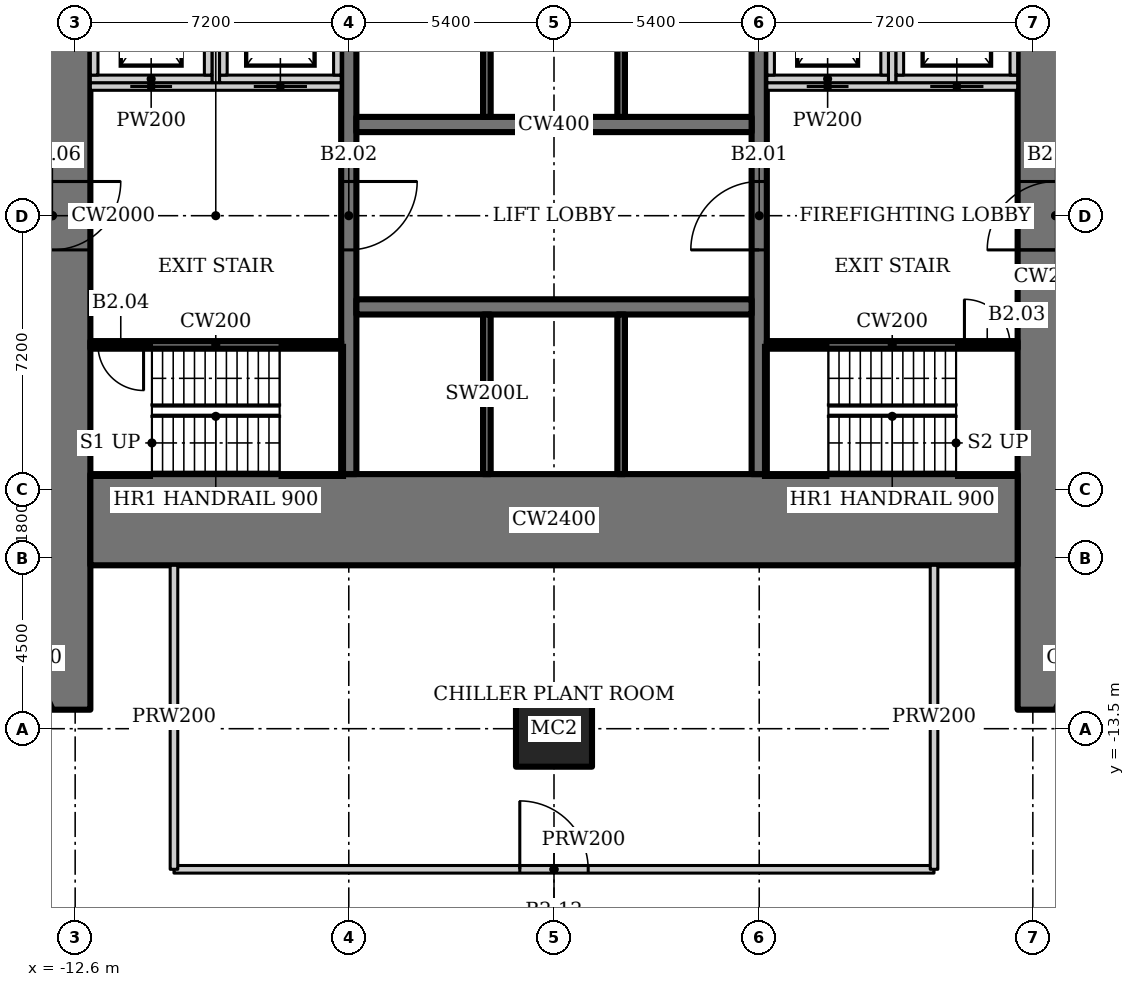
"""IFC4 building model, lengths in metres.
Left out: names, types, materials, properties, quantities, classifications, styles, units other than length and angle.
Written with IfcOpenShell. Run it as: python <this file> out.ifc"""

import sys

from ifc_helpers import new_model, si_unit, direction, frame, frame_2d, origin, origin_2d, place, context, subcontext, project, spatial, rectangle, hollow_rectangle, extrude, element, fill, save


model = new_model("IFC4")
c1 = context("Model", 3, precision=1e-05, world=origin(), true_north=direction((0.0, 1.0)))
c2 = subcontext(c1, "Body", "Model", "MODEL_VIEW")
j1 = project(units=[si_unit("LENGTHUNIT", "METRE"), si_unit("PLANEANGLEUNIT", "RADIAN")], contexts=[c1])
p1 = place(None, origin())
s1 = spatial("IfcSite", under=j1, at=p1, CompositionType="ELEMENT")
p2 = place(p1, origin())
s2 = spatial("IfcBuilding", under=s1, at=p2, CompositionType="ELEMENT")
p3 = place(p2, frame((0.0, 0.0, -10.0)))
s3 = spatial("IfcBuildingStorey", under=s2, at=p3, CompositionType="ELEMENT", Elevation=-10.0)
p4 = place(p3, frame((0.0, -13.5, 0.0), z_axis=(0.0, 0.0, 1.0), x_axis=(1.0, 0.0, 0.0)))
e1 = element("IfcColumn", 1, at=p4, inside=s3, PredefinedType="COLUMN", context=c2, shape_type="SweptSolid", body=[
    extrude(hollow_rectangle(XDim=2.0, YDim=2.0, WallThickness=0.17, at=origin_2d()), origin(), (0.0, 0.0, 1.0), 4.5),
])
p5 = place(p3, frame((13.2, -13.0, 0.0), z_axis=(0.0, 0.0, 1.0), x_axis=(0.0, 1.0, 0.0)))
e2 = element("IfcWall", 2, at=p5, inside=s3, PredefinedType="SHEAR", context=c2, shape_type="SweptSolid", body=[
    extrude(rectangle(XDim=26.0, YDim=2.0, at=frame_2d((13.0, 0.0))), origin(), (0.0, 0.0, 1.0), 4.5),
])
p6 = place(p5, frame((12.1, 0.0, 0.0)))
e3 = element("IfcOpeningElement", 3, at=p6, cuts=e2, PredefinedType="OPENING", context=c2, shape_type="SweptSolid", body=[
    extrude(rectangle(XDim=1.8, YDim=2.1, at=frame_2d((0.9, 1.05))), frame((0.0, 1.01, 0.0), z_axis=(0.0, -1.0, 0.0), x_axis=(1.0, 0.0, 0.0)), (0.0, 0.0, 1.0), 2.02),
])
p7 = place(p3, frame((-13.2, 13.0, 0.0), z_axis=(0.0, 0.0, 1.0), x_axis=(0.0, -1.0, 0.0)))
e4 = element("IfcWall", 4, at=p7, inside=s3, PredefinedType="SHEAR", context=c2, shape_type="SweptSolid", body=[
    extrude(rectangle(XDim=26.0, YDim=2.0, at=frame_2d((13.0, 0.0))), origin(), (0.0, 0.0, 1.0), 4.5),
])
p8 = place(p7, frame((12.1, 0.0, 0.0)))
e5 = element("IfcOpeningElement", 5, at=p8, cuts=e4, PredefinedType="OPENING", context=c2, shape_type="SweptSolid", body=[
    extrude(rectangle(XDim=1.8, YDim=2.1, at=frame_2d((0.9, 1.05))), frame((0.0, 1.01, 0.0), z_axis=(0.0, -1.0, 0.0), x_axis=(1.0, 0.0, 0.0)), (0.0, 0.0, 1.0), 2.02),
])
p9 = place(p3, frame((-12.2, -8.0, 0.0), z_axis=(0.0, 0.0, 1.0), x_axis=(1.0, 0.0, 0.0)))
e6 = element("IfcWall", 6, at=p9, inside=s3, PredefinedType="SHEAR", context=c2, shape_type="SweptSolid", body=[
    extrude(rectangle(XDim=24.4, YDim=2.4, at=frame_2d((12.2, 0.0))), origin(), (0.0, 0.0, 1.0), 4.5),
])
p10 = place(p3, frame((5.4, -6.8, 0.0), z_axis=(0.0, 0.0, 1.0), x_axis=(0.0, 1.0, 0.0)))
e7 = element("IfcWall", 7, at=p10, inside=s3, PredefinedType="SHEAR", context=c2, shape_type="SweptSolid", body=[
    extrude(rectangle(XDim=13.6, YDim=0.4, at=frame_2d((6.8, 0.0))), origin(), (0.0, 0.0, 1.0), 4.5),
])
p11 = place(p10, frame((5.9, 0.0, 0.0)))
e8 = element("IfcOpeningElement", 8, at=p11, cuts=e7, PredefinedType="OPENING", context=c2, shape_type="SweptSolid", body=[
    extrude(rectangle(XDim=1.8, YDim=2.1, at=frame_2d((0.9, 1.05))), frame((0.0, 0.21, 0.0), z_axis=(0.0, -1.0, 0.0), x_axis=(1.0, 0.0, 0.0)), (0.0, 0.0, 1.0), 0.42),
])
p12 = place(p3, frame((-5.4, 6.8, 0.0), z_axis=(0.0, 0.0, 1.0), x_axis=(0.0, -1.0, 0.0)))
e9 = element("IfcWall", 9, at=p12, inside=s3, PredefinedType="SHEAR", context=c2, shape_type="SweptSolid", body=[
    extrude(rectangle(XDim=13.6, YDim=0.4, at=frame_2d((6.8, 0.0))), origin(), (0.0, 0.0, 1.0), 4.5),
])
p13 = place(p12, frame((5.9, 0.0, 0.0)))
e10 = element("IfcOpeningElement", 10, at=p13, cuts=e9, PredefinedType="OPENING", context=c2, shape_type="SweptSolid", body=[
    extrude(rectangle(XDim=1.8, YDim=2.1, at=frame_2d((0.9, 1.05))), frame((0.0, 0.21, 0.0), z_axis=(0.0, -1.0, 0.0), x_axis=(1.0, 0.0, 0.0)), (0.0, 0.0, 1.0), 0.42),
])
p14 = place(p3, frame((-5.2, -2.4, 0.0), z_axis=(0.0, 0.0, 1.0), x_axis=(1.0, 0.0, 0.0)))
e11 = element("IfcWall", 11, at=p14, inside=s3, PredefinedType="SHEAR", context=c2, shape_type="SweptSolid", body=[
    extrude(rectangle(XDim=10.4, YDim=0.4, at=frame_2d((5.2, 0.0))), origin(), (0.0, 0.0, 1.0), 4.5),
])
for number, where, z_axis, x_axis in (
    (12, (-1.767, -2.6, 0.0), (0.0, 0.0, 1.0), (0.0, -1.0, 0.0)),
    (13, (1.767, -2.6, 0.0), (0.0, 0.0, 1.0), (0.0, -1.0, 0.0)),
):
    element("IfcWall", number, at=place(p3, frame(where, z_axis=z_axis, x_axis=x_axis)), inside=s3, PredefinedType="SOLIDWALL", context=c2, shape_type="SweptSolid", body=[
        extrude(rectangle(XDim=4.2, YDim=0.2, at=frame_2d((2.1, 0.0))), origin(), (0.0, 0.0, 1.0), 4.5),
    ])
p15 = place(p3, frame((5.2, 2.4, 0.0), z_axis=(0.0, 0.0, 1.0), x_axis=(-1.0, 0.0, 0.0)))
e14 = element("IfcWall", 14, at=p15, inside=s3, PredefinedType="SHEAR", context=c2, shape_type="SweptSolid", body=[
    extrude(rectangle(XDim=10.4, YDim=0.4, at=frame_2d((5.2, 0.0))), origin(), (0.0, 0.0, 1.0), 4.5),
])
for number, where, z_axis, x_axis in (
    (15, (-1.767, 2.6, 0.0), (0.0, 0.0, 1.0), (0.0, 1.0, 0.0)),
    (16, (1.767, 2.6, 0.0), (0.0, 0.0, 1.0), (0.0, 1.0, 0.0)),
):
    element("IfcWall", number, at=place(p3, frame(where, z_axis=z_axis, x_axis=x_axis)), inside=s3, PredefinedType="SOLIDWALL", context=c2, shape_type="SweptSolid", body=[
        extrude(rectangle(XDim=4.2, YDim=0.2, at=frame_2d((2.1, 0.0))), origin(), (0.0, 0.0, 1.0), 4.5),
    ])
p16 = place(p3, frame((5.6, -3.4, 0.0), z_axis=(0.0, 0.0, 1.0), x_axis=(1.0, 0.0, 0.0)))
e17 = element("IfcWall", 17, at=p16, inside=s3, PredefinedType="SHEAR", context=c2, shape_type="SweptSolid", body=[
    extrude(rectangle(XDim=6.6, YDim=0.2, at=frame_2d((3.3, 0.0))), origin(), (0.0, 0.0, 1.0), 4.5),
])
p17 = place(p16, frame((5.2, 0.0, 0.0)))
e18 = element("IfcOpeningElement", 18, at=p17, cuts=e17, PredefinedType="OPENING", context=c2, shape_type="SweptSolid", body=[
    extrude(rectangle(XDim=1.2, YDim=2.1, at=frame_2d((0.6, 1.05))), frame((0.0, 0.11, 0.0), z_axis=(0.0, -1.0, 0.0), x_axis=(1.0, 0.0, 0.0)), (0.0, 0.0, 1.0), 0.22),
])
p18 = place(p3, frame((12.2, 3.4, 0.0), z_axis=(0.0, 0.0, 1.0), x_axis=(-1.0, 0.0, 0.0)))
e19 = element("IfcWall", 19, at=p18, inside=s3, PredefinedType="SOLIDWALL", context=c2, shape_type="SweptSolid", body=[
    extrude(rectangle(XDim=6.6, YDim=0.2, at=frame_2d((3.3, 0.0))), origin(), (0.0, 0.0, 1.0), 4.5),
])
p19 = place(p18, frame((4.45, 0.0, 0.0)))
e20 = element("IfcOpeningElement", 20, at=p19, cuts=e19, PredefinedType="OPENING", context=c2, shape_type="SweptSolid", body=[
    extrude(rectangle(XDim=1.1, YDim=2.2, at=frame_2d((0.55, 1.1))), frame((0.0, 0.11, 0.0), z_axis=(0.0, -1.0, 0.0), x_axis=(1.0, 0.0, 0.0)), (0.0, 0.0, 1.0), 0.22),
])
p20 = place(p18, frame((0.9, 0.0, 0.0)))
e21 = element("IfcOpeningElement", 21, at=p20, cuts=e19, PredefinedType="OPENING", context=c2, shape_type="SweptSolid", body=[
    extrude(rectangle(XDim=1.4, YDim=2.2, at=frame_2d((0.7, 1.1))), frame((0.0, 0.11, 0.0), z_axis=(0.0, -1.0, 0.0), x_axis=(1.0, 0.0, 0.0)), (0.0, 0.0, 1.0), 0.22),
])
p21 = place(p3, frame((8.9, 3.5, 0.0), z_axis=(0.0, 0.0, 1.0), x_axis=(0.0, 1.0, 0.0)))
e22 = element("IfcWall", 22, at=p21, inside=s3, PredefinedType="SOLIDWALL", context=c2, shape_type="SweptSolid", body=[
    extrude(rectangle(XDim=3.3, YDim=0.2, at=frame_2d((1.65, 0.0))), origin(), (0.0, 0.0, 1.0), 4.5),
])
p22 = place(p3, frame((-5.6, -3.4, 0.0), z_axis=(0.0, 0.0, 1.0), x_axis=(-1.0, 0.0, 0.0)))
e23 = element("IfcWall", 23, at=p22, inside=s3, PredefinedType="SHEAR", context=c2, shape_type="SweptSolid", body=[
    extrude(rectangle(XDim=6.6, YDim=0.2, at=frame_2d((3.3, 0.0))), origin(), (0.0, 0.0, 1.0), 4.5),
])
p23 = place(p22, frame((5.2, 0.0, 0.0)))
e24 = element("IfcOpeningElement", 24, at=p23, cuts=e23, PredefinedType="OPENING", context=c2, shape_type="SweptSolid", body=[
    extrude(rectangle(XDim=1.2, YDim=2.1, at=frame_2d((0.6, 1.05))), frame((0.0, 0.11, 0.0), z_axis=(0.0, -1.0, 0.0), x_axis=(1.0, 0.0, 0.0)), (0.0, 0.0, 1.0), 0.22),
])
p24 = place(p3, frame((-12.2, 3.4, 0.0), z_axis=(0.0, 0.0, 1.0), x_axis=(1.0, 0.0, 0.0)))
e25 = element("IfcWall", 25, at=p24, inside=s3, PredefinedType="SOLIDWALL", context=c2, shape_type="SweptSolid", body=[
    extrude(rectangle(XDim=6.6, YDim=0.2, at=frame_2d((3.3, 0.0))), origin(), (0.0, 0.0, 1.0), 4.5),
])
p25 = place(p24, frame((1.05, 0.0, 0.0)))
e26 = element("IfcOpeningElement", 26, at=p25, cuts=e25, PredefinedType="OPENING", context=c2, shape_type="SweptSolid", body=[
    extrude(rectangle(XDim=1.1, YDim=2.2, at=frame_2d((0.55, 1.1))), frame((0.0, 0.11, 0.0), z_axis=(0.0, -1.0, 0.0), x_axis=(1.0, 0.0, 0.0)), (0.0, 0.0, 1.0), 0.22),
])
p26 = place(p24, frame((4.3, 0.0, 0.0)))
e27 = element("IfcOpeningElement", 27, at=p26, cuts=e25, PredefinedType="OPENING", context=c2, shape_type="SweptSolid", body=[
    extrude(rectangle(XDim=1.4, YDim=2.2, at=frame_2d((0.7, 1.1))), frame((0.0, 0.11, 0.0), z_axis=(0.0, -1.0, 0.0), x_axis=(1.0, 0.0, 0.0)), (0.0, 0.0, 1.0), 0.22),
])
p27 = place(p3, frame((-8.9, 3.5, 0.0), z_axis=(0.0, 0.0, 1.0), x_axis=(0.0, 1.0, 0.0)))
e28 = element("IfcWall", 28, at=p27, inside=s3, PredefinedType="SOLIDWALL", context=c2, shape_type="SweptSolid", body=[
    extrude(rectangle(XDim=3.3, YDim=0.2, at=frame_2d((1.65, 0.0))), origin(), (0.0, 0.0, 1.0), 4.5),
])
p28 = place(p3, frame((-10.0, -17.2, 0.0), z_axis=(0.0, 0.0, 1.0), x_axis=(1.0, 0.0, 0.0)))
e29 = element("IfcWall", 29, at=p28, inside=s3, PredefinedType="SOLIDWALL", context=c2, shape_type="SweptSolid", body=[
    extrude(rectangle(XDim=20.0, YDim=0.2, at=frame_2d((10.0, 0.0))), origin(), (0.0, 0.0, 1.0), 4.2),
])
p29 = place(p28, frame((9.1, 0.0, 0.0)))
e30 = element("IfcOpeningElement", 30, at=p29, cuts=e29, PredefinedType="OPENING", context=c2, shape_type="SweptSolid", body=[
    extrude(rectangle(XDim=1.8, YDim=2.1, at=frame_2d((0.9, 1.05))), frame((0.0, 0.11, 0.0), z_axis=(0.0, -1.0, 0.0), x_axis=(1.0, 0.0, 0.0)), (0.0, 0.0, 1.0), 0.22),
])
for number, where, z_axis, x_axis in (
    (31, (-10.0, -9.2, 0.0), (0.0, 0.0, 1.0), (0.0, -1.0, 0.0)),
    (32, (10.0, -9.2, 0.0), (0.0, 0.0, 1.0), (0.0, -1.0, 0.0)),
):
    element("IfcWall", number, at=place(p3, frame(where, z_axis=z_axis, x_axis=x_axis)), inside=s3, PredefinedType="SOLIDWALL", context=c2, shape_type="SweptSolid", body=[
        extrude(rectangle(XDim=8.0, YDim=0.2, at=frame_2d((4.0, 0.0))), origin(), (0.0, 0.0, 1.0), 4.2),
    ])
for number, where, z_axis, x_axis in (
    (33, (13.2, -13.0, 0.0), (0.0, 0.0, 1.0), (0.42, 0.907, 0.0)),
    (34, (-13.2, -13.0, 0.0), (0.0, 0.0, 1.0), (-0.42, 0.907, 0.0)),
):
    element("IfcWall", number, at=place(p3, frame(where, z_axis=z_axis, x_axis=x_axis)), inside=s3, PredefinedType="PARTITIONING", context=c2, shape_type="SweptSolid", body=[
        extrude(rectangle(XDim=2.975, YDim=0.1, at=frame_2d((1.488, 0.0))), origin(), (0.0, 0.0, 1.0), 4.2),
    ])
p30 = place(p3, frame((-12.2, 3.6, -1.8), z_axis=(0.0, 0.0, 1.0), x_axis=(1.0, 0.0, 0.0)))
e35 = element("IfcWall", 35, at=p30, inside=s3, PredefinedType="SOLIDWALL", context=c2, shape_type="SweptSolid", body=[
    extrude(rectangle(XDim=3.2, YDim=0.2, at=frame_2d((1.6, 0.0))), origin(), (0.0, 0.0, 1.0), 1.0),
])
for number, where, z_axis, x_axis in (
    (36, (-9.1, 3.7, -1.8), (0.0, 0.0, 1.0), (0.0, 1.0, 0.0)),
    (37, (-12.1, 6.6, -1.8), (0.0, 0.0, 1.0), (0.0, -1.0, 0.0)),
):
    element("IfcWall", number, at=place(p3, frame(where, z_axis=z_axis, x_axis=x_axis)), inside=s3, PredefinedType="SOLIDWALL", context=c2, shape_type="SweptSolid", body=[
        extrude(rectangle(XDim=2.9, YDim=0.2, at=frame_2d((1.45, 0.0))), origin(), (0.0, 0.0, 1.0), 1.0),
    ])
p31 = place(p3, frame((-8.8, 3.6, -1.8), z_axis=(0.0, 0.0, 1.0), x_axis=(1.0, 0.0, 0.0)))
e38 = element("IfcWall", 38, at=p31, inside=s3, PredefinedType="SOLIDWALL", context=c2, shape_type="SweptSolid", body=[
    extrude(rectangle(XDim=3.2, YDim=0.2, at=frame_2d((1.6, 0.0))), origin(), (0.0, 0.0, 1.0), 1.0),
])
for number, where, z_axis, x_axis in (
    (39, (-5.7, 3.7, -1.8), (0.0, 0.0, 1.0), (0.0, 1.0, 0.0)),
    (40, (-8.7, 6.6, -1.8), (0.0, 0.0, 1.0), (0.0, -1.0, 0.0)),
):
    element("IfcWall", number, at=place(p3, frame(where, z_axis=z_axis, x_axis=x_axis)), inside=s3, PredefinedType="SOLIDWALL", context=c2, shape_type="SweptSolid", body=[
        extrude(rectangle(XDim=2.9, YDim=0.2, at=frame_2d((1.45, 0.0))), origin(), (0.0, 0.0, 1.0), 1.0),
    ])
p32 = place(p3, frame((5.6, 3.6, -1.8), z_axis=(0.0, 0.0, 1.0), x_axis=(1.0, 0.0, 0.0)))
e41 = element("IfcWall", 41, at=p32, inside=s3, PredefinedType="SOLIDWALL", context=c2, shape_type="SweptSolid", body=[
    extrude(rectangle(XDim=3.2, YDim=0.2, at=frame_2d((1.6, 0.0))), origin(), (0.0, 0.0, 1.0), 1.0),
])
for number, where, z_axis, x_axis in (
    (42, (8.7, 3.7, -1.8), (0.0, 0.0, 1.0), (0.0, 1.0, 0.0)),
    (43, (5.7, 6.6, -1.8), (0.0, 0.0, 1.0), (0.0, -1.0, 0.0)),
):
    element("IfcWall", number, at=place(p3, frame(where, z_axis=z_axis, x_axis=x_axis)), inside=s3, PredefinedType="SOLIDWALL", context=c2, shape_type="SweptSolid", body=[
        extrude(rectangle(XDim=2.9, YDim=0.2, at=frame_2d((1.45, 0.0))), origin(), (0.0, 0.0, 1.0), 1.0),
    ])
p33 = place(p3, frame((9.0, 3.6, -1.8), z_axis=(0.0, 0.0, 1.0), x_axis=(1.0, 0.0, 0.0)))
e44 = element("IfcWall", 44, at=p33, inside=s3, PredefinedType="SOLIDWALL", context=c2, shape_type="SweptSolid", body=[
    extrude(rectangle(XDim=3.2, YDim=0.2, at=frame_2d((1.6, 0.0))), origin(), (0.0, 0.0, 1.0), 1.0),
])
for number, where, z_axis, x_axis in (
    (45, (12.1, 3.7, -1.8), (0.0, 0.0, 1.0), (0.0, 1.0, 0.0)),
    (46, (9.1, 6.6, -1.8), (0.0, 0.0, 1.0), (0.0, -1.0, 0.0)),
):
    element("IfcWall", number, at=place(p3, frame(where, z_axis=z_axis, x_axis=x_axis)), inside=s3, PredefinedType="SOLIDWALL", context=c2, shape_type="SweptSolid", body=[
        extrude(rectangle(XDim=2.9, YDim=0.2, at=frame_2d((1.45, 0.0))), origin(), (0.0, 0.0, 1.0), 1.0),
    ])
p34 = place(p11, origin())
e47 = element("IfcDoor", 47, at=p34, inside=s3, OperationType="DOUBLE_DOOR_DOUBLE_SWING", PredefinedType="DOOR", context=c2, shape_type="SweptSolid", body=[
    extrude(rectangle(XDim=1.8, YDim=2.1, at=frame_2d((0.9, 1.05))), frame((0.0, 0.025, 0.0), z_axis=(0.0, -1.0, 0.0), x_axis=(1.0, 0.0, 0.0)), (0.0, 0.0, 1.0), 0.05),
])
fill(e8, e47)
p35 = place(p13, origin())
e48 = element("IfcDoor", 48, at=p35, inside=s3, OperationType="DOUBLE_DOOR_DOUBLE_SWING", PredefinedType="DOOR", context=c2, shape_type="SweptSolid", body=[
    extrude(rectangle(XDim=1.8, YDim=2.1, at=frame_2d((0.9, 1.05))), frame((0.0, 0.025, 0.0), z_axis=(0.0, -1.0, 0.0), x_axis=(1.0, 0.0, 0.0)), (0.0, 0.0, 1.0), 0.05),
])
fill(e10, e48)
p36 = place(p17, origin())
e49 = element("IfcDoor", 49, at=p36, inside=s3, OperationType="SINGLE_SWING_RIGHT", PredefinedType="DOOR", context=c2, shape_type="SweptSolid", body=[
    extrude(rectangle(XDim=1.2, YDim=2.1, at=frame_2d((0.6, 1.05))), frame((0.0, 0.025, 0.0), z_axis=(0.0, -1.0, 0.0), x_axis=(1.0, 0.0, 0.0)), (0.0, 0.0, 1.0), 0.05),
])
fill(e18, e49)
p37 = place(p23, origin())
e50 = element("IfcDoor", 50, at=p37, inside=s3, OperationType="SINGLE_SWING_RIGHT", PredefinedType="DOOR", context=c2, shape_type="SweptSolid", body=[
    extrude(rectangle(XDim=1.2, YDim=2.1, at=frame_2d((0.6, 1.05))), frame((0.0, 0.025, 0.0), z_axis=(0.0, -1.0, 0.0), x_axis=(1.0, 0.0, 0.0)), (0.0, 0.0, 1.0), 0.05),
])
fill(e24, e50)
p38 = place(p6, origin())
e51 = element("IfcDoor", 51, at=p38, inside=s3, OperationType="DOUBLE_DOOR_DOUBLE_SWING", PredefinedType="DOOR", context=c2, shape_type="SweptSolid", body=[
    extrude(rectangle(XDim=1.8, YDim=2.1, at=frame_2d((0.9, 1.05))), frame((0.0, 0.025, 0.0), z_axis=(0.0, -1.0, 0.0), x_axis=(1.0, 0.0, 0.0)), (0.0, 0.0, 1.0), 0.05),
])
fill(e3, e51)
p39 = place(p8, origin())
e52 = element("IfcDoor", 52, at=p39, inside=s3, OperationType="DOUBLE_DOOR_DOUBLE_SWING", PredefinedType="DOOR", context=c2, shape_type="SweptSolid", body=[
    extrude(rectangle(XDim=1.8, YDim=2.1, at=frame_2d((0.9, 1.05))), frame((0.0, 0.025, 0.0), z_axis=(0.0, -1.0, 0.0), x_axis=(1.0, 0.0, 0.0)), (0.0, 0.0, 1.0), 0.05),
])
fill(e5, e52)
p40 = place(p25, origin())
e53 = element("IfcDoor", 53, at=p40, inside=s3, OperationType="DOUBLE_DOOR_SLIDING", PredefinedType="DOOR", context=c2, shape_type="SweptSolid", body=[
    extrude(rectangle(XDim=1.1, YDim=2.2, at=frame_2d((0.55, 1.1))), frame((0.0, 0.025, 0.0), z_axis=(0.0, -1.0, 0.0), x_axis=(1.0, 0.0, 0.0)), (0.0, 0.0, 1.0), 0.05),
])
fill(e26, e53)
p41 = place(p26, origin())
e54 = element("IfcDoor", 54, at=p41, inside=s3, OperationType="DOUBLE_DOOR_SLIDING", PredefinedType="DOOR", context=c2, shape_type="SweptSolid", body=[
    extrude(rectangle(XDim=1.4, YDim=2.2, at=frame_2d((0.7, 1.1))), frame((0.0, 0.025, 0.0), z_axis=(0.0, -1.0, 0.0), x_axis=(1.0, 0.0, 0.0)), (0.0, 0.0, 1.0), 0.05),
])
fill(e27, e54)
p42 = place(p19, origin())
e55 = element("IfcDoor", 55, at=p42, inside=s3, OperationType="DOUBLE_DOOR_SLIDING", PredefinedType="DOOR", context=c2, shape_type="SweptSolid", body=[
    extrude(rectangle(XDim=1.1, YDim=2.2, at=frame_2d((0.55, 1.1))), frame((0.0, 0.025, 0.0), z_axis=(0.0, -1.0, 0.0), x_axis=(1.0, 0.0, 0.0)), (0.0, 0.0, 1.0), 0.05),
])
fill(e20, e55)
p43 = place(p20, origin())
e56 = element("IfcDoor", 56, at=p43, inside=s3, OperationType="DOUBLE_DOOR_SLIDING", PredefinedType="DOOR", context=c2, shape_type="SweptSolid", body=[
    extrude(rectangle(XDim=1.4, YDim=2.2, at=frame_2d((0.7, 1.1))), frame((0.0, 0.025, 0.0), z_axis=(0.0, -1.0, 0.0), x_axis=(1.0, 0.0, 0.0)), (0.0, 0.0, 1.0), 0.05),
])
fill(e21, e56)
p44 = place(p29, origin())
e57 = element("IfcDoor", 57, at=p44, inside=s3, OperationType="DOUBLE_DOOR_DOUBLE_SWING", PredefinedType="DOOR", context=c2, shape_type="SweptSolid", body=[
    extrude(rectangle(XDim=1.8, YDim=2.1, at=frame_2d((0.9, 1.05))), frame((0.0, 0.025, 0.0), z_axis=(0.0, -1.0, 0.0), x_axis=(1.0, 0.0, 0.0)), (0.0, 0.0, 1.0), 0.05),
])
fill(e30, e57)
save(model, sys.argv[1])
